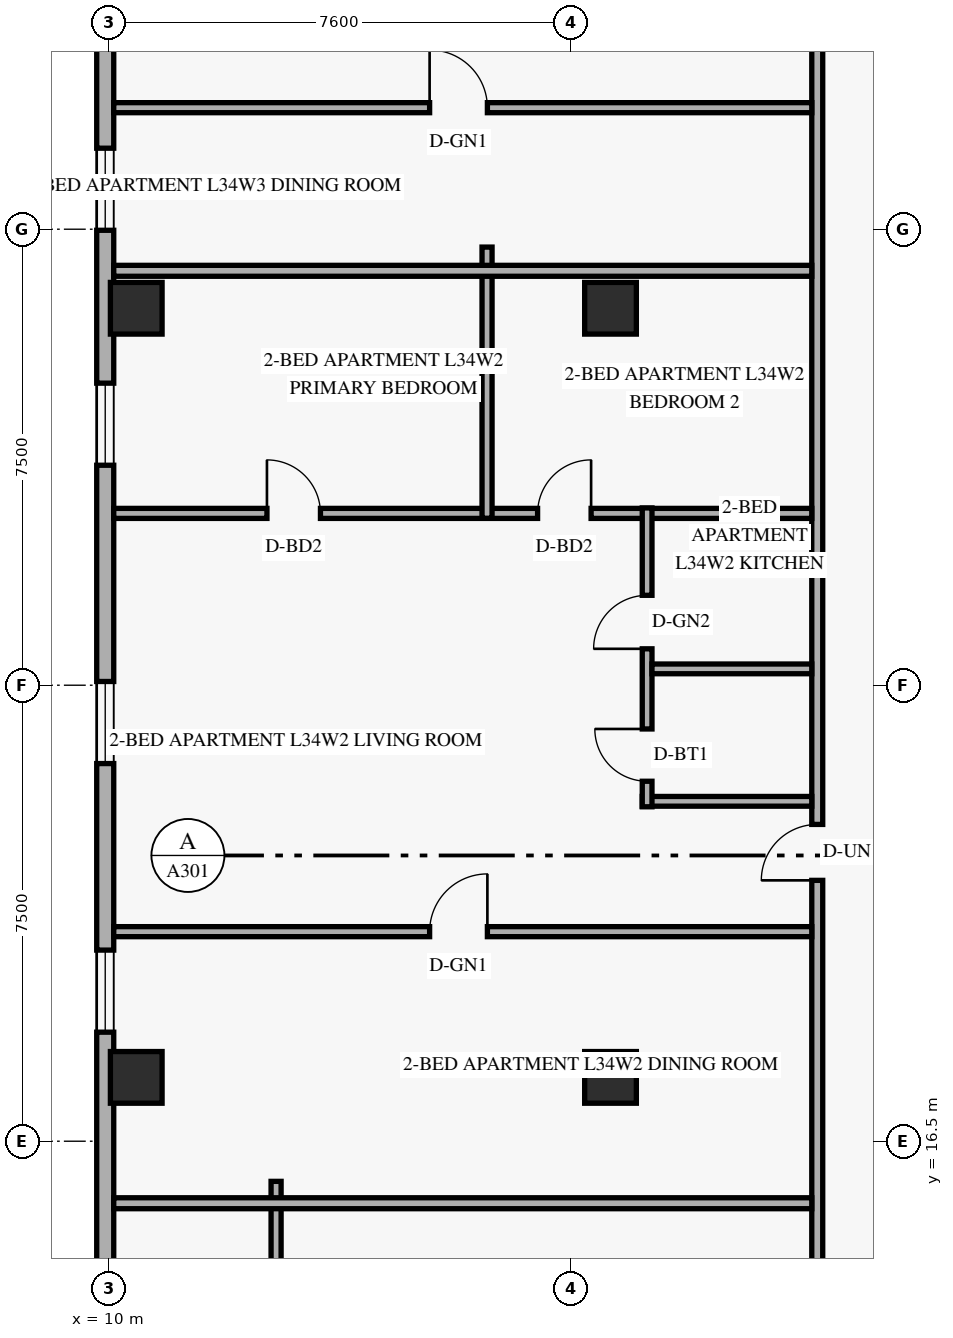
"""IFC4 building model, lengths in metres.
Left out: names, types, materials, properties, quantities, classifications, styles, units other than length and angle.
Written with IfcOpenShell. Run it as: python <this file> out.ifc"""

import sys

from ifc_helpers import new_model, si_unit, direction, frame, frame_2d, origin, origin_2d, place, context, subcontext, project, spatial, rectangle, extrude, element, fill, save


model = new_model("IFC4")
c1 = context("Model", 3, precision=1e-05, world=origin(), true_north=direction((0.0, 1.0)))
c2 = subcontext(c1, "Body", "Model", "MODEL_VIEW")
j1 = project(units=[si_unit("LENGTHUNIT", "METRE"), si_unit("PLANEANGLEUNIT", "RADIAN")], contexts=[c1])
p1 = place(None, origin())
s1 = spatial("IfcSite", under=j1, at=p1, CompositionType="ELEMENT")
p2 = place(p1, origin())
s2 = spatial("IfcBuilding", under=s1, at=p2, CompositionType="ELEMENT")
p3 = place(p2, frame((0.0, 0.0, 132.0)))
s3 = spatial("IfcBuildingStorey", under=s2, at=p3, CompositionType="ELEMENT", Elevation=132.0)
for number, where, z_axis, x_axis in (
    (1, (10.45, 17.55, 0.0), (0.0, 0.0, 1.0), (1.0, 0.0, 0.0)),
    (2, (10.45, 30.2, 0.0), (0.0, 0.0, 1.0), (1.0, 0.0, 0.0)),
    (3, (18.25, 17.55, 0.0), (0.0, 0.0, 1.0), (1.0, 0.0, 0.0)),
    (4, (18.25, 30.2, 0.0), (0.0, 0.0, 1.0), (1.0, 0.0, 0.0)),
):
    element("IfcColumn", number, at=place(p3, frame(where, z_axis=z_axis, x_axis=x_axis)), inside=s3, PredefinedType="COLUMN", context=c2, shape_type="SweptSolid", body=[
        extrude(rectangle(XDim=0.85, YDim=0.85, at=origin_2d()), origin(), (0.0, 0.0, 1.0), 3.6),
    ])
p4 = place(p3, frame((9.94, 41.68, 0.0), z_axis=(0.0, 0.0, 1.0), x_axis=(0.0, -1.0, 0.0)))
e5 = element("IfcWall", 5, at=p4, inside=s3, PredefinedType="SOLIDWALL", context=c2, shape_type="SweptSolid", body=[
    extrude(rectangle(XDim=35.36, YDim=0.28, at=frame_2d((17.68, 0.0))), origin(), (0.0, 0.0, 1.0), 3.3),
])
p5 = place(p4, frame((28.42, 0.0, 0.85)))
e6 = element("IfcOpeningElement", 6, at=p5, cuts=e5, PredefinedType="OPENING", context=c2, shape_type="SweptSolid", body=[
    extrude(rectangle(XDim=1.35, YDim=1.55, at=frame_2d((0.675, 0.775))), frame((0.0, 0.15, 0.0), z_axis=(0.0, -1.0, 0.0), x_axis=(1.0, 0.0, 0.0)), (0.0, 0.0, 1.0), 0.3),
])
p6 = place(p4, frame((22.037, 0.0, 0.85)))
e7 = element("IfcOpeningElement", 7, at=p6, cuts=e5, PredefinedType="OPENING", context=c2, shape_type="SweptSolid", body=[
    extrude(rectangle(XDim=1.35, YDim=1.55, at=frame_2d((0.675, 0.775))), frame((0.0, 0.15, 0.0), z_axis=(0.0, -1.0, 0.0), x_axis=(1.0, 0.0, 0.0)), (0.0, 0.0, 1.0), 0.3),
])
p7 = place(p4, frame((17.619, 0.0, 0.85)))
e8 = element("IfcOpeningElement", 8, at=p7, cuts=e5, PredefinedType="OPENING", context=c2, shape_type="SweptSolid", body=[
    extrude(rectangle(XDim=1.35, YDim=1.55, at=frame_2d((0.675, 0.775))), frame((0.0, 0.15, 0.0), z_axis=(0.0, -1.0, 0.0), x_axis=(1.0, 0.0, 0.0)), (0.0, 0.0, 1.0), 0.3),
])
p8 = place(p4, frame((12.712, 0.0, 0.85)))
e9 = element("IfcOpeningElement", 9, at=p8, cuts=e5, PredefinedType="OPENING", context=c2, shape_type="SweptSolid", body=[
    extrude(rectangle(XDim=1.35, YDim=1.55, at=frame_2d((0.675, 0.775))), frame((0.0, 0.15, 0.0), z_axis=(0.0, -1.0, 0.0), x_axis=(1.0, 0.0, 0.0)), (0.0, 0.0, 1.0), 0.3),
])
p9 = place(p4, frame((8.848, 0.0, 0.85)))
e10 = element("IfcOpeningElement", 10, at=p9, cuts=e5, PredefinedType="OPENING", context=c2, shape_type="SweptSolid", body=[
    extrude(rectangle(XDim=1.35, YDim=1.55, at=frame_2d((0.675, 0.775))), frame((0.0, 0.15, 0.0), z_axis=(0.0, -1.0, 0.0), x_axis=(1.0, 0.0, 0.0)), (0.0, 0.0, 1.0), 0.3),
])
p10 = place(p4, frame((5.101, 0.0, 0.85)))
e11 = element("IfcOpeningElement", 11, at=p10, cuts=e5, PredefinedType="OPENING", context=c2, shape_type="SweptSolid", body=[
    extrude(rectangle(XDim=1.35, YDim=1.55, at=frame_2d((0.675, 0.775))), frame((0.0, 0.15, 0.0), z_axis=(0.0, -1.0, 0.0), x_axis=(1.0, 0.0, 0.0)), (0.0, 0.0, 1.0), 0.3),
])
p11 = place(p3, frame((21.65, 6.8, 0.0), z_axis=(0.0, 0.0, 1.0), x_axis=(0.0, 1.0, 0.0)))
e12 = element("IfcWall", 12, at=p11, inside=s3, PredefinedType="STANDARD", context=c2, shape_type="SweptSolid", body=[
    extrude(rectangle(XDim=34.4, YDim=0.18, at=frame_2d((17.2, 0.0))), origin(), (0.0, 0.0, 1.0), 2.671),
])
p12 = place(p11, frame((5.107, 0.0, 0.0)))
e13 = element("IfcOpeningElement", 13, at=p12, cuts=e12, PredefinedType="OPENING", context=c2, shape_type="SweptSolid", body=[
    extrude(rectangle(XDim=0.92, YDim=2.15, at=frame_2d((0.46, 1.075))), frame((0.0, 0.1, 0.0), z_axis=(0.0, -1.0, 0.0), x_axis=(1.0, 0.0, 0.0)), (0.0, 0.0, 1.0), 0.2),
])
p13 = place(p11, frame((13.99, 0.0, 0.0)))
e14 = element("IfcOpeningElement", 14, at=p13, cuts=e12, PredefinedType="OPENING", context=c2, shape_type="SweptSolid", body=[
    extrude(rectangle(XDim=0.92, YDim=2.15, at=frame_2d((0.46, 1.075))), frame((0.0, 0.1, 0.0), z_axis=(0.0, -1.0, 0.0), x_axis=(1.0, 0.0, 0.0)), (0.0, 0.0, 1.0), 0.2),
])
p14 = place(p11, frame((28.646, 0.0, 0.0)))
e15 = element("IfcOpeningElement", 15, at=p14, cuts=e12, PredefinedType="OPENING", context=c2, shape_type="SweptSolid", body=[
    extrude(rectangle(XDim=0.92, YDim=2.15, at=frame_2d((0.46, 1.075))), frame((0.0, 0.1, 0.0), z_axis=(0.0, -1.0, 0.0), x_axis=(1.0, 0.0, 0.0)), (0.0, 0.0, 1.0), 0.2),
])
p15 = place(p3, frame((12.75, 6.76, 0.0), z_axis=(0.0, 0.0, 1.0), x_axis=(0.0, 1.0, 0.0)))
e16 = element("IfcWall", 16, at=p15, inside=s3, PredefinedType="PARTITIONING", context=c2, shape_type="SweptSolid", body=[
    extrude(rectangle(XDim=9.08, YDim=0.165, at=frame_2d((4.54, 0.0))), origin(), (0.0, 0.0, 1.0), 2.671),
])
p16 = place(p15, frame((3.78, 0.0, 0.0)))
e17 = element("IfcOpeningElement", 17, at=p16, cuts=e16, PredefinedType="OPENING", context=c2, shape_type="SweptSolid", body=[
    extrude(rectangle(XDim=0.95, YDim=2.15, at=frame_2d((0.475, 1.075))), frame((0.0, 0.093, 0.0), z_axis=(0.0, -1.0, 0.0), x_axis=(1.0, 0.0, 0.0)), (0.0, 0.0, 1.0), 0.185),
])
p17 = place(p3, frame((10.08, 15.48, 0.0), z_axis=(0.0, 0.0, 1.0), x_axis=(1.0, 0.0, 0.0)))
e18 = element("IfcWall", 18, at=p17, inside=s3, PredefinedType="PARTITIONING", context=c2, shape_type="SweptSolid", body=[
    extrude(rectangle(XDim=11.48, YDim=0.18, at=frame_2d((5.74, 0.0))), origin(), (0.0, 0.0, 1.0), 2.671),
])
p18 = place(p3, frame((10.08, 26.826, 0.0), z_axis=(0.0, 0.0, 1.0), x_axis=(1.0, 0.0, 0.0)))
e19 = element("IfcWall", 19, at=p18, inside=s3, PredefinedType="PARTITIONING", context=c2, shape_type="SweptSolid", body=[
    extrude(rectangle(XDim=11.48, YDim=0.165, at=frame_2d((5.74, 0.0))), origin(), (0.0, 0.0, 1.0), 2.671),
])
p19 = place(p18, frame((2.52, 0.0, 0.0)))
e20 = element("IfcOpeningElement", 20, at=p19, cuts=e19, PredefinedType="OPENING", context=c2, shape_type="SweptSolid", body=[
    extrude(rectangle(XDim=0.88, YDim=2.14, at=frame_2d((0.44, 1.07))), frame((0.0, 0.093, 0.0), z_axis=(0.0, -1.0, 0.0), x_axis=(1.0, 0.0, 0.0)), (0.0, 0.0, 1.0), 0.185),
])
p20 = place(p18, frame((6.971, 0.0, 0.0)))
e21 = element("IfcOpeningElement", 21, at=p20, cuts=e19, PredefinedType="OPENING", context=c2, shape_type="SweptSolid", body=[
    extrude(rectangle(XDim=0.88, YDim=2.14, at=frame_2d((0.44, 1.07))), frame((0.0, 0.093, 0.0), z_axis=(0.0, -1.0, 0.0), x_axis=(1.0, 0.0, 0.0)), (0.0, 0.0, 1.0), 0.185),
])
p21 = place(p3, frame((18.772, 22.091, 0.0), z_axis=(0.0, 0.0, 1.0), x_axis=(1.0, 0.0, 0.0)))
e22 = element("IfcWall", 22, at=p21, inside=s3, PredefinedType="PLUMBINGWALL", context=c2, shape_type="SweptSolid", body=[
    extrude(rectangle(XDim=2.788, YDim=0.16, at=frame_2d((1.394, 0.0))), origin(), (0.0, 0.0, 1.0), 3.3),
])
p22 = place(p3, frame((18.852, 22.0, 0.0), z_axis=(0.0, 0.0, 1.0), x_axis=(0.0, 1.0, 0.0)))
e23 = element("IfcWall", 23, at=p22, inside=s3, PredefinedType="PLUMBINGWALL", context=c2, shape_type="SweptSolid", body=[
    extrude(rectangle(XDim=4.916, YDim=0.16, at=frame_2d((2.458, 0.0))), origin(), (0.0, 0.0, 1.0), 3.3),
])
p23 = place(p22, frame((0.42, 0.0, 0.0)))
e24 = element("IfcOpeningElement", 24, at=p23, cuts=e23, PredefinedType="OPENING", context=c2, shape_type="SweptSolid", body=[
    extrude(rectangle(XDim=0.86, YDim=2.12, at=frame_2d((0.43, 1.06))), frame((0.0, 0.09, 0.0), z_axis=(0.0, -1.0, 0.0), x_axis=(1.0, 0.0, 0.0)), (0.0, 0.0, 1.0), 0.18),
])
p24 = place(p22, frame((2.598, 0.0, 0.0)))
e25 = element("IfcOpeningElement", 25, at=p24, cuts=e23, PredefinedType="OPENING", context=c2, shape_type="SweptSolid", body=[
    extrude(rectangle(XDim=0.88, YDim=2.12, at=frame_2d((0.44, 1.06))), frame((0.0, 0.09, 0.0), z_axis=(0.0, -1.0, 0.0), x_axis=(1.0, 0.0, 0.0)), (0.0, 0.0, 1.0), 0.18),
])
p25 = place(p3, frame((18.932, 24.269, 0.0), z_axis=(0.0, 0.0, 1.0), x_axis=(1.0, 0.0, 0.0)))
e26 = element("IfcWall", 26, at=p25, inside=s3, PredefinedType="PLUMBINGWALL", context=c2, shape_type="SweptSolid", body=[
    extrude(rectangle(XDim=2.628, YDim=0.16, at=frame_2d((1.314, 0.0))), origin(), (0.0, 0.0, 1.0), 3.3),
])
p26 = place(p3, frame((10.08, 19.947, 0.0), z_axis=(0.0, 0.0, 1.0), x_axis=(1.0, 0.0, 0.0)))
e27 = element("IfcWall", 27, at=p26, inside=s3, PredefinedType="PARTITIONING", context=c2, shape_type="SweptSolid", body=[
    extrude(rectangle(XDim=11.48, YDim=0.165, at=frame_2d((5.74, 0.0))), origin(), (0.0, 0.0, 1.0), 2.671),
])
p27 = place(p26, frame((5.195, 0.0, 0.0)))
e28 = element("IfcOpeningElement", 28, at=p27, cuts=e27, PredefinedType="OPENING", context=c2, shape_type="SweptSolid", body=[
    extrude(rectangle(XDim=0.95, YDim=2.15, at=frame_2d((0.475, 1.075))), frame((0.0, 0.093, 0.0), z_axis=(0.0, -1.0, 0.0), x_axis=(1.0, 0.0, 0.0)), (0.0, 0.0, 1.0), 0.185),
])
p28 = place(p3, frame((16.219, 26.746, 0.0), z_axis=(0.0, 0.0, 1.0), x_axis=(0.0, 1.0, 0.0)))
e29 = element("IfcWall", 29, at=p28, inside=s3, PredefinedType="PARTITIONING", context=c2, shape_type="SweptSolid", body=[
    extrude(rectangle(XDim=4.46, YDim=0.165, at=frame_2d((2.23, 0.0))), origin(), (0.0, 0.0, 1.0), 2.671),
])
p29 = place(p3, frame((10.08, 30.816, 0.0), z_axis=(0.0, 0.0, 1.0), x_axis=(1.0, 0.0, 0.0)))
e30 = element("IfcWall", 30, at=p29, inside=s3, PredefinedType="PARTITIONING", context=c2, shape_type="SweptSolid", body=[
    extrude(rectangle(XDim=11.48, YDim=0.18, at=frame_2d((5.74, 0.0))), origin(), (0.0, 0.0, 1.0), 2.671),
])
p30 = place(p3, frame((10.08, 33.499, 0.0), z_axis=(0.0, 0.0, 1.0), x_axis=(1.0, 0.0, 0.0)))
e31 = element("IfcWall", 31, at=p30, inside=s3, PredefinedType="PARTITIONING", context=c2, shape_type="SweptSolid", body=[
    extrude(rectangle(XDim=11.48, YDim=0.165, at=frame_2d((5.74, 0.0))), origin(), (0.0, 0.0, 1.0), 2.671),
])
p31 = place(p30, frame((5.195, 0.0, 0.0)))
e32 = element("IfcOpeningElement", 32, at=p31, cuts=e31, PredefinedType="OPENING", context=c2, shape_type="SweptSolid", body=[
    extrude(rectangle(XDim=0.95, YDim=2.15, at=frame_2d((0.475, 1.075))), frame((0.0, 0.093, 0.0), z_axis=(0.0, -1.0, 0.0), x_axis=(1.0, 0.0, 0.0)), (0.0, 0.0, 1.0), 0.185),
])
p32 = place(p6, origin())
e33 = element("IfcWindow", 33, at=p32, inside=s3, PartitioningType="SINGLE_PANEL", PredefinedType="WINDOW", context=c2, shape_type="SweptSolid", body=[
    extrude(rectangle(XDim=1.35, YDim=1.55, at=frame_2d((0.675, 0.775))), frame((0.0, 0.03, 0.0), z_axis=(0.0, -1.0, 0.0), x_axis=(1.0, 0.0, 0.0)), (0.0, 0.0, 1.0), 0.06),
])
fill(e7, e33)
p33 = place(p7, origin())
e34 = element("IfcWindow", 34, at=p33, inside=s3, PartitioningType="SINGLE_PANEL", PredefinedType="WINDOW", context=c2, shape_type="SweptSolid", body=[
    extrude(rectangle(XDim=1.35, YDim=1.55, at=frame_2d((0.675, 0.775))), frame((0.0, 0.03, 0.0), z_axis=(0.0, -1.0, 0.0), x_axis=(1.0, 0.0, 0.0)), (0.0, 0.0, 1.0), 0.06),
])
fill(e8, e34)
p34 = place(p8, origin())
e35 = element("IfcWindow", 35, at=p34, inside=s3, PartitioningType="SINGLE_PANEL", PredefinedType="WINDOW", context=c2, shape_type="SweptSolid", body=[
    extrude(rectangle(XDim=1.35, YDim=1.55, at=frame_2d((0.675, 0.775))), frame((0.0, 0.03, 0.0), z_axis=(0.0, -1.0, 0.0), x_axis=(1.0, 0.0, 0.0)), (0.0, 0.0, 1.0), 0.06),
])
fill(e9, e35)
p35 = place(p9, origin())
e36 = element("IfcWindow", 36, at=p35, inside=s3, PartitioningType="SINGLE_PANEL", PredefinedType="WINDOW", context=c2, shape_type="SweptSolid", body=[
    extrude(rectangle(XDim=1.35, YDim=1.55, at=frame_2d((0.675, 0.775))), frame((0.0, 0.03, 0.0), z_axis=(0.0, -1.0, 0.0), x_axis=(1.0, 0.0, 0.0)), (0.0, 0.0, 1.0), 0.06),
])
fill(e10, e36)
p36 = place(p27, origin())
e37 = element("IfcDoor", 37, at=p36, inside=s3, OperationType="SINGLE_SWING_RIGHT", PredefinedType="DOOR", context=c2, shape_type="SweptSolid", body=[
    extrude(rectangle(XDim=0.95, YDim=2.15, at=frame_2d((0.475, 1.075))), frame((0.0, 0.025, 0.0), z_axis=(0.0, -1.0, 0.0), x_axis=(1.0, 0.0, 0.0)), (0.0, 0.0, 1.0), 0.05),
])
fill(e28, e37)
p37 = place(p13, origin())
e38 = element("IfcDoor", 38, at=p37, inside=s3, OperationType="SINGLE_SWING_LEFT", PredefinedType="DOOR", context=c2, shape_type="SweptSolid", body=[
    extrude(rectangle(XDim=0.92, YDim=2.15, at=frame_2d((0.46, 1.075))), frame((0.0, 0.025, 0.0), z_axis=(0.0, -1.0, 0.0), x_axis=(1.0, 0.0, 0.0)), (0.0, 0.0, 1.0), 0.05),
])
fill(e14, e38)
p38 = place(p23, origin())
e39 = element("IfcDoor", 39, at=p38, inside=s3, OperationType="SINGLE_SWING_RIGHT", PredefinedType="DOOR", context=c2, shape_type="SweptSolid", body=[
    extrude(rectangle(XDim=0.86, YDim=2.12, at=frame_2d((0.43, 1.06))), frame((0.0, 0.025, 0.0), z_axis=(0.0, -1.0, 0.0), x_axis=(1.0, 0.0, 0.0)), (0.0, 0.0, 1.0), 0.05),
])
fill(e24, e39)
p39 = place(p24, origin())
e40 = element("IfcDoor", 40, at=p39, inside=s3, OperationType="SINGLE_SWING_LEFT", PredefinedType="DOOR", context=c2, shape_type="SweptSolid", body=[
    extrude(rectangle(XDim=0.88, YDim=2.12, at=frame_2d((0.44, 1.06))), frame((0.0, 0.025, 0.0), z_axis=(0.0, -1.0, 0.0), x_axis=(1.0, 0.0, 0.0)), (0.0, 0.0, 1.0), 0.05),
])
fill(e25, e40)
p40 = place(p19, origin())
e41 = element("IfcDoor", 41, at=p40, inside=s3, OperationType="SINGLE_SWING_LEFT", PredefinedType="DOOR", context=c2, shape_type="SweptSolid", body=[
    extrude(rectangle(XDim=0.88, YDim=2.14, at=frame_2d((0.44, 1.07))), frame((0.0, 0.025, 0.0), z_axis=(0.0, -1.0, 0.0), x_axis=(1.0, 0.0, 0.0)), (0.0, 0.0, 1.0), 0.05),
])
fill(e20, e41)
p41 = place(p20, origin())
e42 = element("IfcDoor", 42, at=p41, inside=s3, OperationType="SINGLE_SWING_RIGHT", PredefinedType="DOOR", context=c2, shape_type="SweptSolid", body=[
    extrude(rectangle(XDim=0.88, YDim=2.14, at=frame_2d((0.44, 1.07))), frame((0.0, 0.025, 0.0), z_axis=(0.0, -1.0, 0.0), x_axis=(1.0, 0.0, 0.0)), (0.0, 0.0, 1.0), 0.05),
])
fill(e21, e42)
p42 = place(p31, origin())
e43 = element("IfcDoor", 43, at=p42, inside=s3, OperationType="SINGLE_SWING_LEFT", PredefinedType="DOOR", context=c2, shape_type="SweptSolid", body=[
    extrude(rectangle(XDim=0.95, YDim=2.15, at=frame_2d((0.475, 1.075))), frame((0.0, 0.025, 0.0), z_axis=(0.0, -1.0, 0.0), x_axis=(1.0, 0.0, 0.0)), (0.0, 0.0, 1.0), 0.05),
])
fill(e32, e43)
save(model, sys.argv[1])
